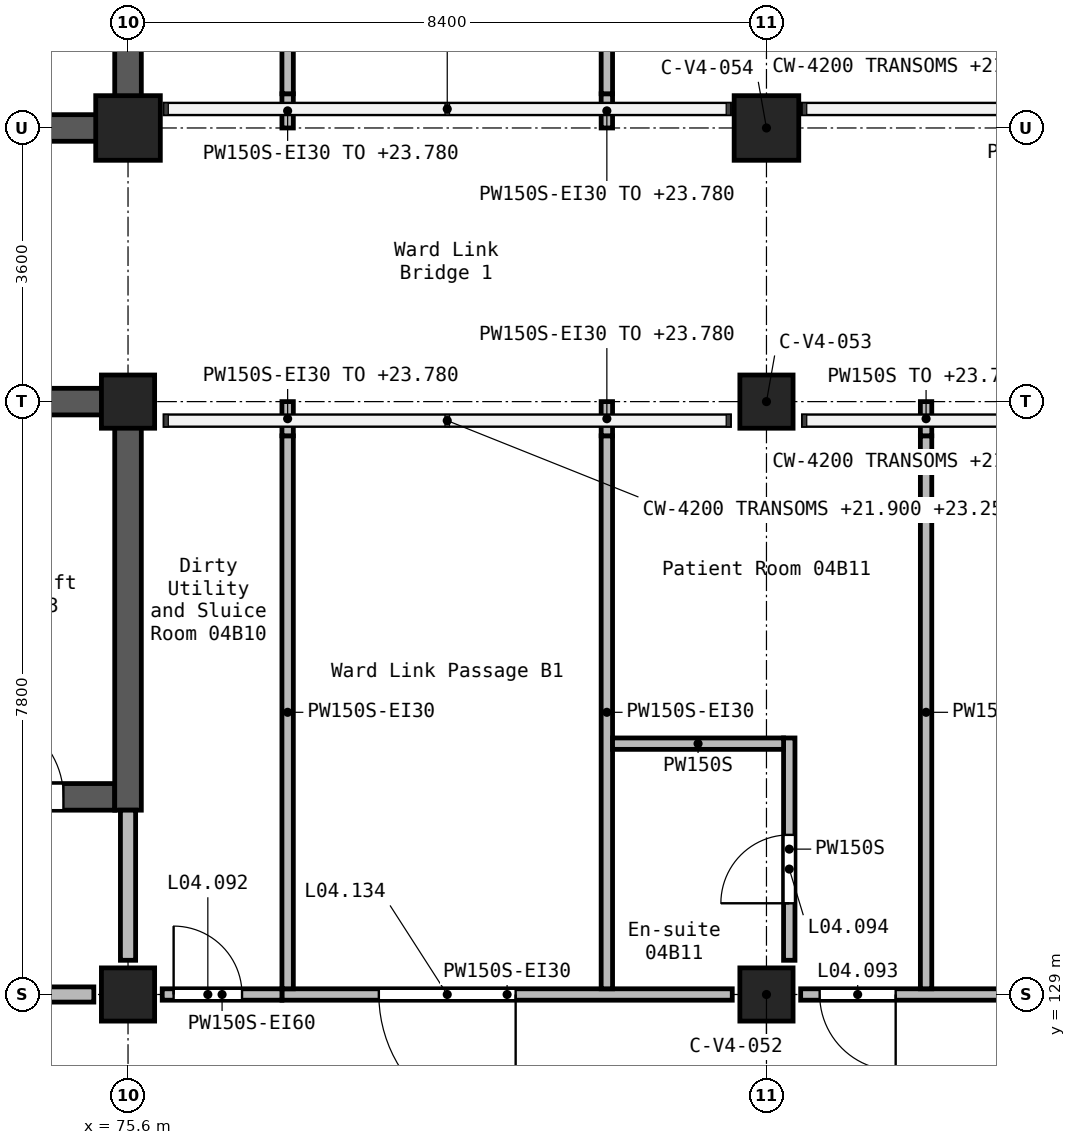
"""IFC4 building model, lengths in metres.
Left out: names, types, materials, properties, quantities, classifications, styles, units other than length and angle.
Written with IfcOpenShell. Run it as: python <this file> out.ifc"""

import sys

from ifc_helpers import new_model, si_unit, direction, frame, frame_2d, origin, origin_2d, place, context, subcontext, project, spatial, rectangle, extrude, element, fill, save


model = new_model("IFC4")
c1 = context("Model", 3, precision=1e-05, world=origin(), true_north=direction((0.0, 1.0)))
c2 = subcontext(c1, "Body", "Model", "MODEL_VIEW")
j1 = project(units=[si_unit("LENGTHUNIT", "METRE"), si_unit("PLANEANGLEUNIT", "RADIAN")], contexts=[c1])
p1 = place(None, origin())
s1 = spatial("IfcSite", under=j1, at=p1, CompositionType="ELEMENT")
p2 = place(p1, origin())
s2 = spatial("IfcBuilding", under=s1, at=p2, CompositionType="ELEMENT")
p3 = place(p2, frame((0.0, 0.0, 21.0)))
s3 = spatial("IfcBuildingStorey", under=s2, at=p3, CompositionType="ELEMENT", Elevation=21.0)
for number, where, z_axis, x_axis in (
    (1, (75.6, 129.0, 0.0), (0.0, 0.0, 1.0), (1.0, 0.0, 0.0)),
    (2, (75.6, 136.8, 0.0), (0.0, 0.0, 1.0), (1.0, 0.0, 0.0)),
):
    element("IfcColumn", number, at=place(p3, frame(where, z_axis=z_axis, x_axis=x_axis)), inside=s3, PredefinedType="COLUMN", context=c2, shape_type="SweptSolid", body=[
        extrude(rectangle(XDim=0.7, YDim=0.7, at=origin_2d()), origin(), (0.0, 0.0, 1.0), 3.9),
    ])
p4 = place(p3, frame((75.6, 140.4, 0.0), z_axis=(0.0, 0.0, 1.0), x_axis=(1.0, 0.0, 0.0)))
e3 = element("IfcColumn", 3, at=p4, inside=s3, PredefinedType="COLUMN", context=c2, shape_type="SweptSolid", body=[
    extrude(rectangle(XDim=0.85, YDim=0.85, at=origin_2d()), origin(), (0.0, 0.0, 1.0), 3.9),
])
for number, where, z_axis, x_axis in (
    (4, (84.0, 129.0, 0.0), (0.0, 0.0, 1.0), (1.0, 0.0, 0.0)),
    (5, (84.0, 136.8, 0.0), (0.0, 0.0, 1.0), (1.0, 0.0, 0.0)),
):
    element("IfcColumn", number, at=place(p3, frame(where, z_axis=z_axis, x_axis=x_axis)), inside=s3, PredefinedType="COLUMN", context=c2, shape_type="SweptSolid", body=[
        extrude(rectangle(XDim=0.7, YDim=0.7, at=origin_2d()), origin(), (0.0, 0.0, 1.0), 3.9),
    ])
p5 = place(p3, frame((84.0, 140.4, 0.0), z_axis=(0.0, 0.0, 1.0), x_axis=(1.0, 0.0, 0.0)))
e6 = element("IfcColumn", 6, at=p5, inside=s3, PredefinedType="COLUMN", context=c2, shape_type="SweptSolid", body=[
    extrude(rectangle(XDim=0.85, YDim=0.85, at=origin_2d()), origin(), (0.0, 0.0, 1.0), 3.9),
])
p6 = place(p3, frame((72.8, 131.6, 0.0), z_axis=(0.0, 0.0, 1.0), x_axis=(1.0, 0.0, 0.0)))
e7 = element("IfcWall", 7, at=p6, inside=s3, PredefinedType="SHEAR", context=c2, shape_type="SweptSolid", body=[
    extrude(rectangle(XDim=2.625, YDim=0.35, at=frame_2d((1.312, 0.0))), origin(), (0.0, 0.0, 1.0), 3.9),
])
p7 = place(p6, frame((0.85, 0.0, 0.0)))
e8 = element("IfcOpeningElement", 8, at=p7, cuts=e7, PredefinedType="OPENING", context=c2, shape_type="SweptSolid", body=[
    extrude(rectangle(XDim=1.1, YDim=2.1, at=frame_2d((0.55, 1.05))), frame((0.0, 0.185, 0.0), z_axis=(0.0, -1.0, 0.0), x_axis=(1.0, 0.0, 0.0)), (0.0, 0.0, 1.0), 0.37),
])
for number, where, z_axis, x_axis in (
    (9, (72.8, 136.8, 0.0), (0.0, 0.0, 1.0), (1.0, 0.0, 0.0)),
    (10, (72.8, 140.4, 0.0), (0.0, 0.0, 1.0), (1.0, 0.0, 0.0)),
):
    element("IfcWall", number, at=place(p3, frame(where, z_axis=z_axis, x_axis=x_axis)), inside=s3, PredefinedType="SHEAR", context=c2, shape_type="SweptSolid", body=[
        extrude(rectangle(XDim=2.625, YDim=0.35, at=frame_2d((1.312, 0.0))), origin(), (0.0, 0.0, 1.0), 3.9),
    ])
p8 = place(p3, frame((75.6, 131.425, 0.0), z_axis=(0.0, 0.0, 1.0), x_axis=(0.0, 1.0, 0.0)))
e11 = element("IfcWall", 11, at=p8, inside=s3, PredefinedType="SHEAR", context=c2, shape_type="SweptSolid", body=[
    extrude(rectangle(XDim=5.55, YDim=0.35, at=frame_2d((2.775, 0.0))), origin(), (0.0, 0.0, 1.0), 3.9),
])
p9 = place(p3, frame((75.6, 140.225, 0.0), z_axis=(0.0, 0.0, 1.0), x_axis=(0.0, 1.0, 0.0)))
e12 = element("IfcWall", 12, at=p9, inside=s3, PredefinedType="SHEAR", context=c2, shape_type="SweptSolid", body=[
    extrude(rectangle(XDim=5.55, YDim=0.35, at=frame_2d((2.775, 0.0))), origin(), (0.0, 0.0, 1.0), 3.9),
])
p10 = place(p3, frame((67.65, 129.0, 0.0), z_axis=(0.0, 0.0, 1.0), x_axis=(1.0, 0.0, 0.0)))
e13 = element("IfcWall", 13, at=p10, inside=s3, PredefinedType="SOLIDWALL", context=c2, shape_type="SweptSolid", body=[
    extrude(rectangle(XDim=7.5, YDim=0.2, at=frame_2d((3.75, 0.0))), origin(), (0.0, 0.0, 1.0), 3.6),
])
p11 = place(p10, frame((2.85, 0.0, 0.0)))
e14 = element("IfcOpeningElement", 14, at=p11, cuts=e13, PredefinedType="OPENING", context=c2, shape_type="SweptSolid", body=[
    extrude(rectangle(XDim=1.8, YDim=2.1, at=frame_2d((0.9, 1.05))), frame((0.0, 0.11, 0.0), z_axis=(0.0, -1.0, 0.0), x_axis=(1.0, 0.0, 0.0)), (0.0, 0.0, 1.0), 0.22),
])
p12 = place(p3, frame((75.6, 129.45, 0.0), z_axis=(0.0, 0.0, 1.0), x_axis=(0.0, 1.0, 0.0)))
e15 = element("IfcWall", 15, at=p12, inside=s3, PredefinedType="SOLIDWALL", context=c2, shape_type="SweptSolid", body=[
    extrude(rectangle(XDim=1.975, YDim=0.2, at=frame_2d((0.988, 0.0))), origin(), (0.0, 0.0, 1.0), 3.6),
])
p13 = place(p3, frame((91.95, 129.0, 0.0), z_axis=(0.0, 0.0, 1.0), x_axis=(-1.0, 0.0, 0.0)))
e16 = element("IfcWall", 16, at=p13, inside=s3, PredefinedType="PARTITIONING", context=c2, shape_type="SweptSolid", body=[
    extrude(rectangle(XDim=7.5, YDim=0.15, at=frame_2d((3.75, 0.0))), origin(), (0.0, 0.0, 1.0), 3.6),
])
p14 = place(p13, frame((6.25, 0.0, 0.0)))
e17 = element("IfcOpeningElement", 17, at=p14, cuts=e16, PredefinedType="OPENING", context=c2, shape_type="SweptSolid", body=[
    extrude(rectangle(XDim=1.0, YDim=2.1, at=frame_2d((0.5, 1.05))), frame((0.0, 0.085, 0.0), z_axis=(0.0, -1.0, 0.0), x_axis=(1.0, 0.0, 0.0)), (0.0, 0.0, 1.0), 0.17),
])
p15 = place(p13, frame((1.8, 0.0, 0.0)))
e18 = element("IfcOpeningElement", 18, at=p15, cuts=e16, PredefinedType="OPENING", context=c2, shape_type="SweptSolid", body=[
    extrude(rectangle(XDim=1.8, YDim=2.1, at=frame_2d((0.9, 1.05))), frame((0.0, 0.085, 0.0), z_axis=(0.0, -1.0, 0.0), x_axis=(1.0, 0.0, 0.0)), (0.0, 0.0, 1.0), 0.17),
])
p16 = place(p3, frame((83.55, 129.0, 0.0), z_axis=(0.0, 0.0, 1.0), x_axis=(-1.0, 0.0, 0.0)))
e19 = element("IfcWall", 19, at=p16, inside=s3, PredefinedType="PARTITIONING", context=c2, shape_type="SweptSolid", body=[
    extrude(rectangle(XDim=5.925, YDim=0.15, at=frame_2d((2.962, 0.0))), origin(), (0.0, 0.0, 1.0), 3.6),
])
p17 = place(p16, frame((2.85, 0.0, 0.0)))
e20 = element("IfcOpeningElement", 20, at=p17, cuts=e19, PredefinedType="OPENING", context=c2, shape_type="SweptSolid", body=[
    extrude(rectangle(XDim=1.8, YDim=2.1, at=frame_2d((0.9, 1.05))), frame((0.0, 0.085, 0.0), z_axis=(0.0, -1.0, 0.0), x_axis=(1.0, 0.0, 0.0)), (0.0, 0.0, 1.0), 0.17),
])
p18 = place(p3, frame((77.7, 129.075, 0.0), z_axis=(0.0, 0.0, 1.0), x_axis=(0.0, 1.0, 0.0)))
e21 = element("IfcWall", 21, at=p18, inside=s3, PredefinedType="PARTITIONING", context=c2, shape_type="SweptSolid", body=[
    extrude(rectangle(XDim=7.275, YDim=0.15, at=frame_2d((3.638, 0.0))), origin(), (0.0, 0.0, 1.0), 3.6),
])
p19 = place(p3, frame((77.7, 136.35, 0.0), z_axis=(0.0, 0.0, 1.0), x_axis=(0.0, 1.0, 0.0)))
e22 = element("IfcWall", 22, at=p19, inside=s3, PredefinedType="PARTITIONING", context=c2, shape_type="SweptSolid", body=[
    extrude(rectangle(XDim=0.45, YDim=0.15, at=frame_2d((0.225, 0.0))), origin(), (0.0, 0.0, 1.0), 2.78),
])
p20 = place(p3, frame((81.9, 129.075, 0.0), z_axis=(0.0, 0.0, 1.0), x_axis=(0.0, 1.0, 0.0)))
e23 = element("IfcWall", 23, at=p20, inside=s3, PredefinedType="PARTITIONING", context=c2, shape_type="SweptSolid", body=[
    extrude(rectangle(XDim=7.275, YDim=0.15, at=frame_2d((3.638, 0.0))), origin(), (0.0, 0.0, 1.0), 3.6),
])
p21 = place(p3, frame((81.9, 136.35, 0.0), z_axis=(0.0, 0.0, 1.0), x_axis=(0.0, 1.0, 0.0)))
e24 = element("IfcWall", 24, at=p21, inside=s3, PredefinedType="PARTITIONING", context=c2, shape_type="SweptSolid", body=[
    extrude(rectangle(XDim=0.45, YDim=0.15, at=frame_2d((0.225, 0.0))), origin(), (0.0, 0.0, 1.0), 2.78),
])
p22 = place(p3, frame((77.7, 140.4, 0.0), z_axis=(0.0, 0.0, 1.0), x_axis=(0.0, 1.0, 0.0)))
e25 = element("IfcWall", 25, at=p22, inside=s3, PredefinedType="PARTITIONING", context=c2, shape_type="SweptSolid", body=[
    extrude(rectangle(XDim=0.45, YDim=0.15, at=frame_2d((0.225, 0.0))), origin(), (0.0, 0.0, 1.0), 2.78),
])
p23 = place(p3, frame((77.7, 140.85, 0.0), z_axis=(0.0, 0.0, 1.0), x_axis=(0.0, 1.0, 0.0)))
e26 = element("IfcWall", 26, at=p23, inside=s3, PredefinedType="PARTITIONING", context=c2, shape_type="SweptSolid", body=[
    extrude(rectangle(XDim=7.275, YDim=0.15, at=frame_2d((3.637, 0.0))), origin(), (0.0, 0.0, 1.0), 3.6),
])
p24 = place(p3, frame((81.9, 140.4, 0.0), z_axis=(0.0, 0.0, 1.0), x_axis=(0.0, 1.0, 0.0)))
e27 = element("IfcWall", 27, at=p24, inside=s3, PredefinedType="PARTITIONING", context=c2, shape_type="SweptSolid", body=[
    extrude(rectangle(XDim=0.45, YDim=0.15, at=frame_2d((0.225, 0.0))), origin(), (0.0, 0.0, 1.0), 2.78),
])
p25 = place(p3, frame((81.9, 140.85, 0.0), z_axis=(0.0, 0.0, 1.0), x_axis=(0.0, 1.0, 0.0)))
e28 = element("IfcWall", 28, at=p25, inside=s3, PredefinedType="PARTITIONING", context=c2, shape_type="SweptSolid", body=[
    extrude(rectangle(XDim=7.275, YDim=0.15, at=frame_2d((3.637, 0.0))), origin(), (0.0, 0.0, 1.0), 3.6),
])
p26 = place(p3, frame((76.05, 129.0, 0.0), z_axis=(0.0, 0.0, 1.0), x_axis=(1.0, 0.0, 0.0)))
e29 = element("IfcWall", 29, at=p26, inside=s3, PredefinedType="PARTITIONING", context=c2, shape_type="SweptSolid", body=[
    extrude(rectangle(XDim=1.575, YDim=0.15, at=frame_2d((0.788, 0.0))), origin(), (0.0, 0.0, 1.0), 3.6),
])
p27 = place(p26, frame((0.15, 0.0, 0.0)))
e30 = element("IfcOpeningElement", 30, at=p27, cuts=e29, PredefinedType="OPENING", context=c2, shape_type="SweptSolid", body=[
    extrude(rectangle(XDim=0.9, YDim=2.1, at=frame_2d((0.45, 1.05))), frame((0.0, 0.085, 0.0), z_axis=(0.0, -1.0, 0.0), x_axis=(1.0, 0.0, 0.0)), (0.0, 0.0, 1.0), 0.17),
])
p28 = place(p3, frame((86.1, 129.075, 0.0), z_axis=(0.0, 0.0, 1.0), x_axis=(0.0, 1.0, 0.0)))
e31 = element("IfcWall", 31, at=p28, inside=s3, PredefinedType="PARTITIONING", context=c2, shape_type="SweptSolid", body=[
    extrude(rectangle(XDim=7.275, YDim=0.15, at=frame_2d((3.638, 0.0))), origin(), (0.0, 0.0, 1.0), 3.6),
])
p29 = place(p3, frame((86.1, 136.35, 0.0), z_axis=(0.0, 0.0, 1.0), x_axis=(0.0, 1.0, 0.0)))
e32 = element("IfcWall", 32, at=p29, inside=s3, PredefinedType="PARTITIONING", context=c2, shape_type="SweptSolid", body=[
    extrude(rectangle(XDim=0.45, YDim=0.15, at=frame_2d((0.225, 0.0))), origin(), (0.0, 0.0, 1.0), 2.78),
])
p30 = place(p3, frame((84.3, 129.45, 0.0), z_axis=(0.0, 0.0, 1.0), x_axis=(0.0, 1.0, 0.0)))
e33 = element("IfcWall", 33, at=p30, inside=s3, PredefinedType="PARTITIONING", context=c2, shape_type="SweptSolid", body=[
    extrude(rectangle(XDim=2.925, YDim=0.15, at=frame_2d((1.462, 0.0))), origin(), (0.0, 0.0, 1.0), 3.6),
])
p31 = place(p30, frame((0.75, 0.0, 0.0)))
e34 = element("IfcOpeningElement", 34, at=p31, cuts=e33, PredefinedType="OPENING", context=c2, shape_type="SweptSolid", body=[
    extrude(rectangle(XDim=0.9, YDim=2.1, at=frame_2d((0.45, 1.05))), frame((0.0, 0.085, 0.0), z_axis=(0.0, -1.0, 0.0), x_axis=(1.0, 0.0, 0.0)), (0.0, 0.0, 1.0), 0.17),
])
p32 = place(p3, frame((81.975, 132.3, 0.0), z_axis=(0.0, 0.0, 1.0), x_axis=(1.0, 0.0, 0.0)))
e35 = element("IfcWall", 35, at=p32, inside=s3, PredefinedType="PARTITIONING", context=c2, shape_type="SweptSolid", body=[
    extrude(rectangle(XDim=2.25, YDim=0.15, at=frame_2d((1.125, 0.0))), origin(), (0.0, 0.0, 1.0), 3.6),
])
p33 = place(p27, origin())
e36 = element("IfcDoor", 36, at=p33, inside=s3, OperationType="SINGLE_SWING_LEFT", PredefinedType="DOOR", context=c2, shape_type="SweptSolid", body=[
    extrude(rectangle(XDim=0.9, YDim=2.1, at=frame_2d((0.45, 1.05))), frame((0.0, 0.025, 0.0), z_axis=(0.0, -1.0, 0.0), x_axis=(1.0, 0.0, 0.0)), (0.0, 0.0, 1.0), 0.05),
])
fill(e30, e36)
p34 = place(p14, frame((1.0, 0.0, 0.0), z_axis=(0.0, 0.0, 1.0), x_axis=(-1.0, 0.0, 0.0)))
e37 = element("IfcDoor", 37, at=p34, inside=s3, OperationType="SINGLE_SWING_LEFT", PredefinedType="DOOR", context=c2, shape_type="SweptSolid", body=[
    extrude(rectangle(XDim=1.0, YDim=2.1, at=frame_2d((0.5, 1.05))), frame((0.0, 0.025, 0.0), z_axis=(0.0, -1.0, 0.0), x_axis=(1.0, 0.0, 0.0)), (0.0, 0.0, 1.0), 0.05),
])
fill(e17, e37)
p35 = place(p31, origin())
e38 = element("IfcDoor", 38, at=p35, inside=s3, OperationType="SINGLE_SWING_LEFT", PredefinedType="DOOR", context=c2, shape_type="SweptSolid", body=[
    extrude(rectangle(XDim=0.9, YDim=2.1, at=frame_2d((0.45, 1.05))), frame((0.0, 0.025, 0.0), z_axis=(0.0, -1.0, 0.0), x_axis=(1.0, 0.0, 0.0)), (0.0, 0.0, 1.0), 0.05),
])
fill(e34, e38)
p36 = place(p17, frame((1.8, 0.0, 0.0), z_axis=(0.0, 0.0, 1.0), x_axis=(-1.0, 0.0, 0.0)))
e39 = element("IfcDoor", 39, at=p36, inside=s3, OperationType="DOUBLE_DOOR_SINGLE_SWING", PredefinedType="DOOR", context=c2, shape_type="SweptSolid", body=[
    extrude(rectangle(XDim=1.8, YDim=2.1, at=frame_2d((0.9, 1.05))), frame((0.0, 0.025, 0.0), z_axis=(0.0, -1.0, 0.0), x_axis=(1.0, 0.0, 0.0)), (0.0, 0.0, 1.0), 0.05),
])
fill(e20, e39)
p37 = place(p7, origin())
e40 = element("IfcDoor", 40, at=p37, inside=s3, OperationType="DOUBLE_DOOR_SLIDING", PredefinedType="DOOR", context=c2, shape_type="SweptSolid", body=[
    extrude(rectangle(XDim=1.1, YDim=2.1, at=frame_2d((0.55, 1.05))), frame((0.0, 0.025, 0.0), z_axis=(0.0, -1.0, 0.0), x_axis=(1.0, 0.0, 0.0)), (0.0, 0.0, 1.0), 0.05),
])
fill(e8, e40)
save(model, sys.argv[1])
